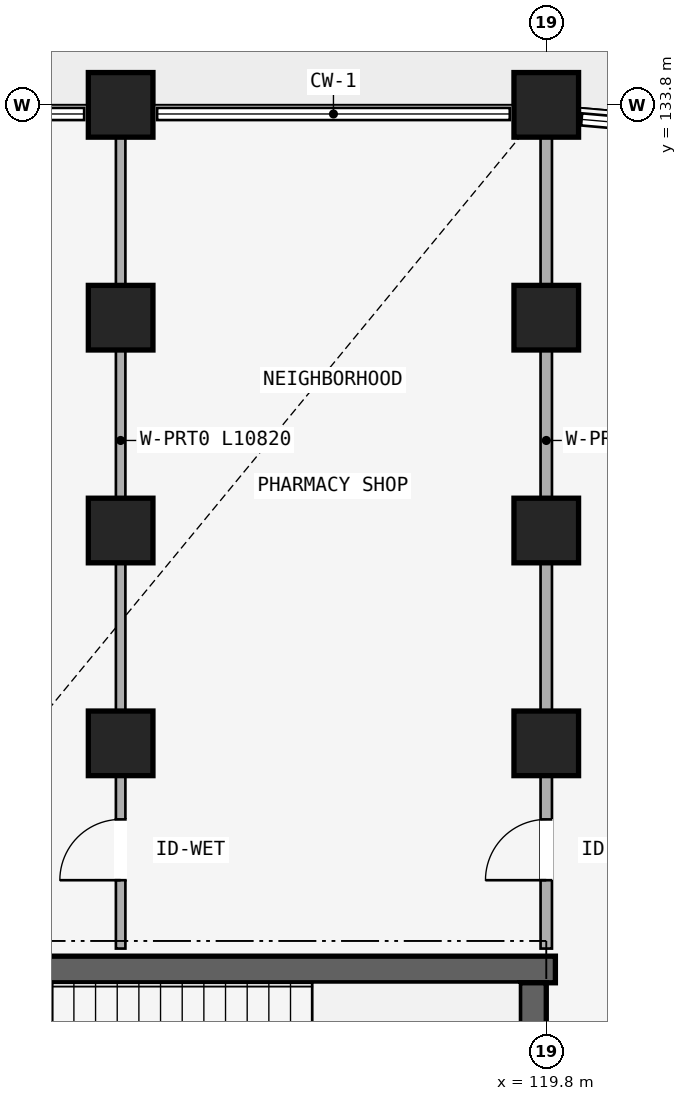
"""IFC4 building model, lengths in metres.
Left out: names, types, materials, properties, quantities, classifications, styles, units other than length and angle.
Written with IfcOpenShell. Run it as: python <this file> out.ifc"""

import sys

from ifc_helpers import new_model, si_unit, direction, frame, frame_2d, origin, origin_2d, place, context, subcontext, project, spatial, rectangle, extrude, element, fill, save


model = new_model("IFC4")
c1 = context("Model", 3, precision=1e-05, world=origin(), true_north=direction((0.0, 1.0)))
c2 = subcontext(c1, "Body", "Model", "MODEL_VIEW")
j1 = project(units=[si_unit("LENGTHUNIT", "METRE"), si_unit("PLANEANGLEUNIT", "RADIAN")], contexts=[c1])
p1 = place(None, origin())
s1 = spatial("IfcSite", under=j1, at=p1, CompositionType="ELEMENT")
p2 = place(p1, origin())
s2 = spatial("IfcBuilding", under=s1, at=p2, CompositionType="ELEMENT")
p3 = place(p2, origin())
s3 = spatial("IfcBuildingStorey", under=s2, at=p3, CompositionType="ELEMENT", Elevation=0.0)
p4 = place(p3, frame((119.92, 122.425, 0.0), z_axis=(0.0, 0.0, 1.0), x_axis=(-1.0, 0.0, 0.0)))
e1 = element("IfcWall", 1, at=p4, inside=s3, PredefinedType="SHEAR", context=c2, shape_type="SweptSolid", body=[
    extrude(rectangle(XDim=8.545, YDim=0.35, at=frame_2d((4.272, 0.0))), origin(), (0.0, 0.0, 1.0), 4.15),
])
p5 = place(p3, frame((119.625, 118.65, 0.0), z_axis=(0.0, 0.0, 1.0), x_axis=(0.0, 1.0, 0.0)))
e2 = element("IfcWall", 2, at=p5, inside=s3, PredefinedType="SHEAR", context=c2, shape_type="SweptSolid", body=[
    extrude(rectangle(XDim=3.6, YDim=0.35, at=frame_2d((1.8, 0.0))), origin(), (0.0, 0.0, 1.0), 4.15),
])
for number, where, z_axis, x_axis in (
    (3, (119.8, 125.4, 0.0), (0.0, 0.0, 1.0), (1.0, 0.0, 0.0)),
    (4, (119.8, 128.2, 0.0), (0.0, 0.0, 1.0), (1.0, 0.0, 0.0)),
    (5, (119.8, 131.0, 0.0), (0.0, 0.0, 1.0), (1.0, 0.0, 0.0)),
    (6, (119.8, 133.8, 0.0), (0.0, 0.0, 1.0), (1.0, 0.0, 0.0)),
    (7, (114.2, 125.4, 0.0), (0.0, 0.0, 1.0), (1.0, 0.0, 0.0)),
    (8, (114.2, 128.2, 0.0), (0.0, 0.0, 1.0), (1.0, 0.0, 0.0)),
    (9, (114.2, 131.0, 0.0), (0.0, 0.0, 1.0), (1.0, 0.0, 0.0)),
    (10, (114.2, 133.8, 0.0), (0.0, 0.0, 1.0), (1.0, 0.0, 0.0)),
):
    element("IfcColumn", number, at=place(p3, frame(where, z_axis=z_axis, x_axis=x_axis)), inside=s3, PredefinedType="COLUMN", context=c2, shape_type="SweptSolid", body=[
        extrude(rectangle(XDim=0.85, YDim=0.85, at=origin_2d()), origin(), (0.0, 0.0, 1.0), 4.15),
    ])
p6 = place(p3, frame((114.2, 122.7, 0.0), z_axis=(0.0, 0.0, 1.0), x_axis=(0.0, 1.0, 0.0)))
e11 = element("IfcWall", 11, at=p6, inside=s3, PredefinedType="PARTITIONING", context=c2, shape_type="SweptSolid", body=[
    extrude(rectangle(XDim=10.82, YDim=0.125, at=frame_2d((5.41, 0.0))), origin(), (0.0, 0.0, 1.0), 3.492),
])
p7 = place(p6, frame((0.899, 0.0, 0.0)))
e12 = element("IfcOpeningElement", 12, at=p7, cuts=e11, PredefinedType="OPENING", context=c2, shape_type="SweptSolid", body=[
    extrude(rectangle(XDim=0.8, YDim=2.1, at=frame_2d((0.4, 1.05))), frame((0.0, 0.073, 0.0), z_axis=(0.0, -1.0, 0.0), x_axis=(1.0, 0.0, 0.0)), (0.0, 0.0, 1.0), 0.145),
])
p8 = place(p3, frame((119.8, 122.7, 0.0), z_axis=(0.0, 0.0, 1.0), x_axis=(0.0, 1.0, 0.0)))
e13 = element("IfcWall", 13, at=p8, inside=s3, PredefinedType="PARTITIONING", context=c2, shape_type="SweptSolid", body=[
    extrude(rectangle(XDim=10.82, YDim=0.15, at=frame_2d((5.41, 0.0))), origin(), (0.0, 0.0, 1.0), 3.492),
])
p9 = place(p8, frame((0.899, 0.0, 0.0)))
e14 = element("IfcOpeningElement", 14, at=p9, cuts=e13, PredefinedType="OPENING", context=c2, shape_type="SweptSolid", body=[
    extrude(rectangle(XDim=0.8, YDim=2.1, at=frame_2d((0.4, 1.05))), frame((0.0, 0.085, 0.0), z_axis=(0.0, -1.0, 0.0), x_axis=(1.0, 0.0, 0.0)), (0.0, 0.0, 1.0), 0.17),
])
p10 = place(p7, origin())
e15 = element("IfcDoor", 15, at=p10, inside=s3, OperationType="SINGLE_SWING_LEFT", PredefinedType="DOOR", context=c2, shape_type="SweptSolid", body=[
    extrude(rectangle(XDim=0.8, YDim=2.1, at=frame_2d((0.4, 1.05))), frame((0.0, 0.025, 0.0), z_axis=(0.0, -1.0, 0.0), x_axis=(1.0, 0.0, 0.0)), (0.0, 0.0, 1.0), 0.05),
])
fill(e12, e15)
p11 = place(p9, origin())
e16 = element("IfcDoor", 16, at=p11, inside=s3, OperationType="SINGLE_SWING_LEFT", PredefinedType="DOOR", context=c2, shape_type="SweptSolid", body=[
    extrude(rectangle(XDim=0.8, YDim=2.1, at=frame_2d((0.4, 1.05))), frame((0.0, 0.025, 0.0), z_axis=(0.0, -1.0, 0.0), x_axis=(1.0, 0.0, 0.0)), (0.0, 0.0, 1.0), 0.05),
])
fill(e14, e16)
save(model, sys.argv[1])
